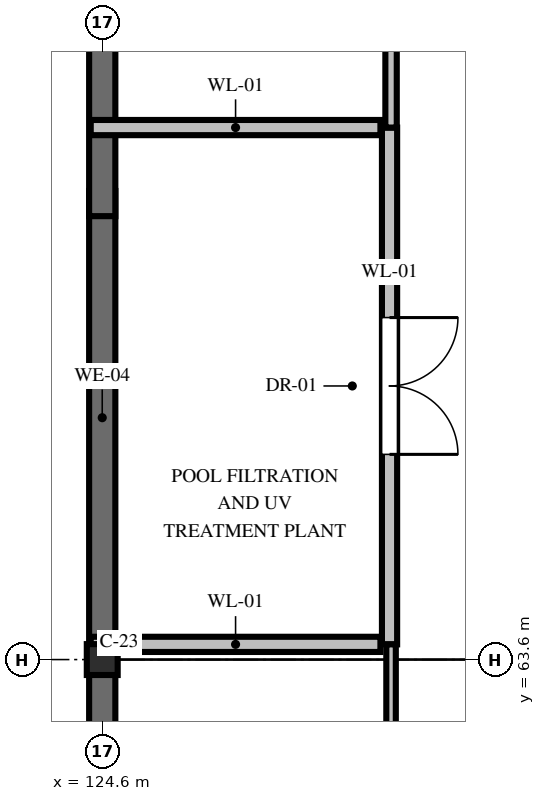
"""IFC4 building model, lengths in metres.
Left out: names, types, materials, properties, quantities, classifications, styles, units other than length and angle.
Written with IfcOpenShell. Run it as: python <this file> out.ifc"""

import sys

from ifc_helpers import new_model, si_unit, direction, frame, frame_2d, origin, origin_2d, place, context, subcontext, project, spatial, rectangle, hollow_circle, extrude, element, fill, save


model = new_model("IFC4")
c1 = context("Model", 3, precision=1e-05, world=origin(), true_north=direction((0.0, 1.0)))
c2 = subcontext(c1, "Body", "Model", "MODEL_VIEW")
j1 = project(units=[si_unit("LENGTHUNIT", "METRE"), si_unit("PLANEANGLEUNIT", "RADIAN")], contexts=[c1])
p1 = place(None, origin())
s1 = spatial("IfcSite", under=j1, at=p1, CompositionType="ELEMENT")
p2 = place(p1, origin())
s2 = spatial("IfcBuilding", under=s1, at=p2, CompositionType="ELEMENT")
p3 = place(p2, frame((0.0, 0.0, 10.8)))
s3 = spatial("IfcBuildingStorey", under=s2, at=p3, CompositionType="ELEMENT", Elevation=10.8)
p4 = place(p3, frame((124.6, 63.6, 0.0), z_axis=(0.0, 0.0, 1.0), x_axis=(1.0, 0.0, 0.0)))
e1 = element("IfcColumn", 1, at=p4, inside=s3, PredefinedType="COLUMN", context=c2, shape_type="SweptSolid", body=[
    extrude(hollow_circle(Radius=0.203, WallThickness=0.016, at=origin_2d()), origin(), (0.0, 0.0, 1.0), 6.0),
])
p5 = place(p3, frame((124.6, 63.799, 0.0), z_axis=(0.0, 0.0, 1.0), x_axis=(0.0, 1.0, 0.0)))
e2 = element("IfcWall", 2, at=p5, inside=s3, PredefinedType="SOLIDWALL", context=c2, shape_type="SweptSolid", body=[
    extrude(rectangle(XDim=5.966, YDim=0.345, at=frame_2d((2.983, 0.0))), origin(), (0.0, 0.0, 1.0), 4.956),
])
p6 = place(p3, frame((124.6, 69.434, 0.0), z_axis=(0.0, 0.0, 1.0), x_axis=(0.0, 1.0, 0.0)))
e3 = element("IfcWall", 3, at=p6, inside=s3, PredefinedType="SOLIDWALL", context=c2, shape_type="SweptSolid", body=[
    extrude(rectangle(XDim=5.895, YDim=0.345, at=frame_2d((2.947, 0.0))), origin(), (0.0, 0.0, 1.0), 4.956),
])
p7 = place(p3, frame((124.6, 57.434, 0.0), z_axis=(0.0, 0.0, 1.0), x_axis=(0.0, 1.0, 0.0)))
e4 = element("IfcWall", 4, at=p7, inside=s3, PredefinedType="SOLIDWALL", context=c2, shape_type="SweptSolid", body=[
    extrude(rectangle(XDim=5.967, YDim=0.345, at=frame_2d((2.983, 0.0))), origin(), (0.0, 0.0, 1.0), 5.048),
])
p8 = place(p3, frame((128.38, 70.6, 0.0), z_axis=(0.0, 0.0, 1.0), x_axis=(0.0, -1.0, 0.0)))
e5 = element("IfcWall", 5, at=p8, inside=s3, PredefinedType="SOLIDWALL", context=c2, shape_type="SweptSolid", body=[
    extrude(rectangle(XDim=6.8, YDim=0.2, at=frame_2d((3.4, 0.0))), origin(), (0.0, 0.0, 1.0), 5.05),
])
p9 = place(p8, frame((2.5, 0.0, 0.0)))
e6 = element("IfcOpeningElement", 6, at=p9, cuts=e5, PredefinedType="OPENING", context=c2, shape_type="SweptSolid", body=[
    extrude(rectangle(XDim=1.8, YDim=2.3, at=frame_2d((0.9, 1.15))), frame((0.0, 0.11, 0.0), z_axis=(0.0, -1.0, 0.0), x_axis=(1.0, 0.0, 0.0)), (0.0, 0.0, 1.0), 0.22),
])
for number, where, z_axis, x_axis in (
    (7, (128.26, 63.8, 0.0), (0.0, 0.0, 1.0), (-1.0, 0.0, 0.0)),
    (8, (124.448, 70.6, 0.0), (0.0, 0.0, 1.0), (1.0, 0.0, 0.0)),
):
    element("IfcWall", number, at=place(p3, frame(where, z_axis=z_axis, x_axis=x_axis)), inside=s3, PredefinedType="SOLIDWALL", context=c2, shape_type="SweptSolid", body=[
        extrude(rectangle(XDim=3.812, YDim=0.2, at=frame_2d((1.906, 0.0))), origin(), (0.0, 0.0, 1.0), 4.958),
    ])
p10 = place(p3, frame((128.4, 51.52, 0.0), z_axis=(0.0, 0.0, 1.0), x_axis=(0.0, 1.0, 0.0)))
e9 = element("IfcWall", 9, at=p10, inside=s3, PredefinedType="PARTITIONING", context=c2, shape_type="SweptSolid", body=[
    extrude(rectangle(XDim=12.28, YDim=0.125, at=frame_2d((6.14, 0.0))), origin(), (0.0, 0.0, 1.0), 5.05),
])
p11 = place(p3, frame((128.4, 70.6, 0.0), z_axis=(0.0, 0.0, 1.0), x_axis=(0.0, 1.0, 0.0)))
e10 = element("IfcWall", 10, at=p11, inside=s3, PredefinedType="PARTITIONING", context=c2, shape_type="SweptSolid", body=[
    extrude(rectangle(XDim=2.2, YDim=0.15, at=frame_2d((1.1, 0.0))), origin(), (0.0, 0.0, 1.0), 5.65),
])
p12 = place(p9, origin())
e11 = element("IfcDoor", 11, at=p12, inside=s3, OperationType="DOUBLE_DOOR_SINGLE_SWING", PredefinedType="DOOR", context=c2, shape_type="SweptSolid", body=[
    extrude(rectangle(XDim=1.8, YDim=2.3, at=frame_2d((0.9, 1.15))), frame((0.0, 0.025, 0.0), z_axis=(0.0, -1.0, 0.0), x_axis=(1.0, 0.0, 0.0)), (0.0, 0.0, 1.0), 0.05),
])
fill(e6, e11)
save(model, sys.argv[1])
